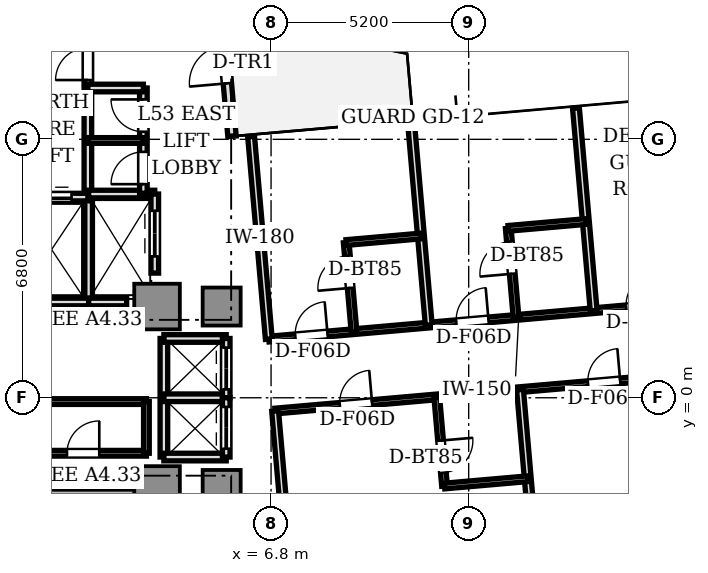
"""IFC4 building model, lengths in metres.
Left out: names, types, materials, properties, quantities, classifications, styles, units other than length and angle.
Written with IfcOpenShell. Run it as: python <this file> out.ifc"""

import sys

from ifc_helpers import new_model, si_unit, direction, frame, frame_2d, origin, origin_2d, place, context, subcontext, project, spatial, rectangle, extrude, source, transform, mapped, element, fill, save


model = new_model("IFC4")
c1 = context("Model", 3, precision=1e-05, world=origin(), true_north=direction((0.0, 1.0)))
c2 = subcontext(c1, "Body", "Model", "MODEL_VIEW")
j1 = project(units=[si_unit("LENGTHUNIT", "METRE"), si_unit("PLANEANGLEUNIT", "RADIAN")], contexts=[c1])
p1 = place(None, origin())
s1 = spatial("IfcSite", under=j1, at=p1, CompositionType="ELEMENT")
p2 = place(p1, origin())
s2 = spatial("IfcBuilding", under=s1, at=p2, CompositionType="ELEMENT")
p3 = place(p2, frame((0.0, 0.0, 191.95)))
s3 = spatial("IfcBuildingStorey", under=s2, at=p3, CompositionType="ELEMENT", Elevation=191.95)
m1 = source(origin(), c2, "Body", "SweptSolid", [
    extrude(rectangle(XDim=1.2, YDim=1.2, at=origin_2d()), origin(), (0.0, 0.0, 1.0), 3.11),
])
for number, where, z_axis, x_axis in (
    (1, (3.8, 2.4, 0.0), (0.0, 0.0, 1.0), (1.0, 0.0, 0.0)),
    (2, (3.8, -2.4, 0.0), (0.0, 0.0, 1.0), (1.0, 0.0, 0.0)),
):
    element("IfcColumn", number, at=place(p3, frame(where, z_axis=z_axis, x_axis=x_axis)), inside=s3, PredefinedType="COLUMN", context=c2, shape_type="MappedRepresentation", body=[
        mapped(m1, transform((0.0, 0.0, 0.0), scale=1.0)),
    ])
m2 = source(origin(), c2, "Body", "SweptSolid", [
    extrude(rectangle(XDim=1.0, YDim=1.0, at=origin_2d()), origin(), (0.0, 0.0, 1.0), 3.11),
])
for number, where, z_axis, x_axis in (
    (3, (5.5, 2.4, 0.0), (0.0, 0.0, 1.0), (1.0, 0.0, 0.0)),
    (4, (5.5, -2.4, 0.0), (0.0, 0.0, 1.0), (1.0, 0.0, 0.0)),
):
    element("IfcColumn", number, at=place(p3, frame(where, z_axis=z_axis, x_axis=x_axis)), inside=s3, PredefinedType="COLUMN", context=c2, shape_type="MappedRepresentation", body=[
        mapped(m2, transform((0.0, 0.0, 0.0), scale=1.0)),
    ])
p4 = place(p3, frame((5.772, 6.879, 0.0), z_axis=(0.0, 0.0, 1.0), x_axis=(-0.087168071984, 0.996193619346, 0.0)))
e5 = element("IfcWall", 5, at=p4, inside=s3, PredefinedType="STANDARD", context=c2, shape_type="SweptSolid", body=[
    extrude(rectangle(XDim=2.7, YDim=0.22, at=frame_2d((1.35, 0.0))), origin(), (0.0, 0.0, 1.0), 3.11),
])
p5 = place(p4, frame((1.4, 0.0, 0.0)))
e6 = element("IfcOpeningElement", 6, at=p5, cuts=e5, PredefinedType="OPENING", context=c2, shape_type="SweptSolid", body=[
    extrude(rectangle(XDim=1.0, YDim=2.2, at=frame_2d((0.5, 1.1))), frame((0.0, 0.12, 0.0), z_axis=(0.0, -1.0, 0.0), x_axis=(1.0, 0.0, 0.0)), (0.0, 0.0, 1.0), 0.24),
])
p6 = place(p3, frame((0.0, -2.5, 0.0), z_axis=(0.0, 0.0, 1.0), x_axis=(1.0, 0.0, 0.0)))
e7 = element("IfcWall", 7, at=p6, inside=s3, PredefinedType="SOLIDWALL", context=c2, shape_type="SweptSolid", body=[
    extrude(rectangle(XDim=3.72, YDim=0.2, at=frame_2d((1.86, 0.0))), origin(), (0.0, 0.0, 1.0), 3.11),
])
p7 = place(p3, frame((1.98, 5.32, 0.0), z_axis=(0.0, 0.0, 1.0), x_axis=(0.0, 1.0, 0.0)))
e8 = element("IfcWall", 8, at=p7, inside=s3, PredefinedType="SOLIDWALL", context=c2, shape_type="SweptSolid", body=[
    extrude(rectangle(XDim=4.66, YDim=0.2, at=frame_2d((2.33, 0.0))), origin(), (0.0, 0.0, 1.0), 2.66),
])
p8 = place(p7, frame((3.04, 0.0, 0.0)))
e9 = element("IfcOpeningElement", 9, at=p8, cuts=e8, PredefinedType="OPENING", context=c2, shape_type="SweptSolid", body=[
    extrude(rectangle(XDim=0.85, YDim=2.1, at=frame_2d((0.425, 1.05))), frame((0.0, 0.11, 0.0), z_axis=(0.0, -1.0, 0.0), x_axis=(1.0, 0.0, 0.0)), (0.0, 0.0, 1.0), 0.22),
])
p9 = place(p3, frame((2.0, 2.5, 0.0), z_axis=(0.0, 0.0, 1.0), x_axis=(0.0, 1.0, 0.0)))
e10 = element("IfcWall", 10, at=p9, inside=s3, PredefinedType="SOLIDWALL", context=c2, shape_type="SweptSolid", body=[
    extrude(rectangle(XDim=2.78, YDim=0.2, at=frame_2d((1.39, 0.0))), origin(), (0.0, 0.0, 1.0), 2.66),
])
p10 = place(p3, frame((0.05, 2.52, 0.0), z_axis=(0.0, 0.0, 1.0), x_axis=(1.0, 0.0, 0.0)))
e11 = element("IfcWall", 11, at=p10, inside=s3, PredefinedType="SOLIDWALL", context=c2, shape_type="SweptSolid", body=[
    extrude(rectangle(XDim=1.95, YDim=0.2, at=frame_2d((0.975, 0.0))), origin(), (0.0, 0.0, 1.0), 2.66),
])
p11 = place(p3, frame((0.05, 5.28, 0.0), z_axis=(0.0, 0.0, 1.0), x_axis=(1.0, 0.0, 0.0)))
e12 = element("IfcWall", 12, at=p11, inside=s3, PredefinedType="SOLIDWALL", context=c2, shape_type="SweptSolid", body=[
    extrude(rectangle(XDim=1.93, YDim=0.2, at=frame_2d((0.965, 0.0))), origin(), (0.0, 0.0, 1.0), 2.66),
])
p12 = place(p11, frame((0.4, 0.0, 0.0)))
e13 = element("IfcOpeningElement", 13, at=p12, cuts=e12, PredefinedType="OPENING", context=c2, shape_type="SweptSolid", body=[
    extrude(rectangle(XDim=1.1, YDim=2.2, at=frame_2d((0.55, 1.1))), frame((0.0, 0.11, 0.0), z_axis=(0.0, -1.0, 0.0), x_axis=(1.0, 0.0, 0.0)), (0.0, 0.0, 1.0), 0.22),
])
p13 = place(p3, frame((2.0, 2.52, 0.0), z_axis=(0.0, 0.0, 1.0), x_axis=(1.0, 0.0, 0.0)))
e14 = element("IfcWall", 14, at=p13, inside=s3, PredefinedType="SOLIDWALL", context=c2, shape_type="SweptSolid", body=[
    extrude(rectangle(XDim=1.0, YDim=0.2, at=frame_2d((0.5, 0.0))), origin(), (0.0, 0.0, 1.0), 2.66),
])
p14 = place(p3, frame((2.0, 5.36, 0.0), z_axis=(0.0, 0.0, 1.0), x_axis=(1.0, 0.0, 0.0)))
e15 = element("IfcWall", 15, at=p14, inside=s3, PredefinedType="SOLIDWALL", context=c2, shape_type="SweptSolid", body=[
    extrude(rectangle(XDim=1.74, YDim=0.2, at=frame_2d((0.87, 0.0))), origin(), (0.0, 0.0, 1.0), 2.66),
])
p15 = place(p3, frame((3.74, 3.28, 0.0), z_axis=(0.0, 0.0, 1.0), x_axis=(0.0, 1.0, 0.0)))
e16 = element("IfcWall", 16, at=p15, inside=s3, PredefinedType="SOLIDWALL", context=c2, shape_type="SweptSolid", body=[
    extrude(rectangle(XDim=2.08, YDim=0.2, at=frame_2d((1.04, 0.0))), origin(), (0.0, 0.0, 1.0), 2.66),
])
p16 = place(p15, frame((0.44, 0.0, 0.0)))
e17 = element("IfcOpeningElement", 17, at=p16, cuts=e16, PredefinedType="OPENING", context=c2, shape_type="SweptSolid", body=[
    extrude(rectangle(XDim=1.2, YDim=2.2, at=frame_2d((0.6, 1.1))), frame((0.0, 0.11, 0.0), z_axis=(0.0, -1.0, 0.0), x_axis=(1.0, 0.0, 0.0)), (0.0, 0.0, 1.0), 0.22),
])
p17 = place(p3, frame((3.98, -1.56, 0.0), z_axis=(0.0, 0.0, 1.0), x_axis=(0.0, 1.0, 0.0)))
e18 = element("IfcWall", 18, at=p17, inside=s3, PredefinedType="SOLIDWALL", context=c2, shape_type="SweptSolid", body=[
    extrude(rectangle(XDim=3.12, YDim=0.2, at=frame_2d((1.56, 0.0))), origin(), (0.0, 0.0, 1.0), 2.28),
])
for number, where, z_axis, x_axis in (
    (19, (3.98, 1.56, 0.0), (0.0, 0.0, 1.0), (1.0, 0.0, 0.0)),
    (20, (3.98, -1.56, 0.0), (0.0, 0.0, 1.0), (1.0, 0.0, 0.0)),
    (21, (3.98, 0.0, 0.0), (0.0, 0.0, 1.0), (1.0, 0.0, 0.0)),
):
    element("IfcWall", number, at=place(p3, frame(where, z_axis=z_axis, x_axis=x_axis)), inside=s3, PredefinedType="SOLIDWALL", context=c2, shape_type="SweptSolid", body=[
        extrude(rectangle(XDim=1.64, YDim=0.2, at=frame_2d((0.82, 0.0))), origin(), (0.0, 0.0, 1.0), 2.66),
    ])
p18 = place(p3, frame((5.62, 0.0, 0.0), z_axis=(0.0, 0.0, 1.0), x_axis=(0.0, 1.0, 0.0)))
e22 = element("IfcWall", 22, at=p18, inside=s3, PredefinedType="SOLIDWALL", context=c2, shape_type="SweptSolid", body=[
    extrude(rectangle(XDim=1.56, YDim=0.2, at=frame_2d((0.78, 0.0))), origin(), (0.0, 0.0, 1.0), 2.66),
])
p19 = place(p18, frame((0.22, 0.0, 0.0)))
e23 = element("IfcOpeningElement", 23, at=p19, cuts=e22, PredefinedType="OPENING", context=c2, shape_type="SweptSolid", body=[
    extrude(rectangle(XDim=1.1, YDim=2.2, at=frame_2d((0.55, 1.1))), frame((0.0, 0.11, 0.0), z_axis=(0.0, -1.0, 0.0), x_axis=(1.0, 0.0, 0.0)), (0.0, 0.0, 1.0), 0.22),
])
p20 = place(p3, frame((5.62, -1.56, 0.0), z_axis=(0.0, 0.0, 1.0), x_axis=(0.0, 1.0, 0.0)))
e24 = element("IfcWall", 24, at=p20, inside=s3, PredefinedType="SOLIDWALL", context=c2, shape_type="SweptSolid", body=[
    extrude(rectangle(XDim=1.56, YDim=0.2, at=frame_2d((0.78, 0.0))), origin(), (0.0, 0.0, 1.0), 2.66),
])
p21 = place(p20, frame((0.22, 0.0, 0.0)))
e25 = element("IfcOpeningElement", 25, at=p21, cuts=e24, PredefinedType="OPENING", context=c2, shape_type="SweptSolid", body=[
    extrude(rectangle(XDim=1.1, YDim=2.2, at=frame_2d((0.55, 1.1))), frame((0.0, 0.11, 0.0), z_axis=(0.0, -1.0, 0.0), x_axis=(1.0, 0.0, 0.0)), (0.0, 0.0, 1.0), 0.22),
])
p22 = place(p3, frame((3.44, 5.38, 0.0), z_axis=(0.0, 0.0, 1.0), x_axis=(0.0, 1.0, 0.0)))
e26 = element("IfcWall", 26, at=p22, inside=s3, PredefinedType="SOLIDWALL", context=c2, shape_type="SweptSolid", body=[
    extrude(rectangle(XDim=2.77, YDim=0.2, at=frame_2d((1.385, 0.0))), origin(), (0.0, 0.0, 1.0), 2.66),
])
p23 = place(p22, frame((0.24, 0.0, 0.0)))
e27 = element("IfcOpeningElement", 27, at=p23, cuts=e26, PredefinedType="OPENING", context=c2, shape_type="SweptSolid", body=[
    extrude(rectangle(XDim=0.85, YDim=2.1, at=frame_2d((0.425, 1.05))), frame((0.0, 0.11, 0.0), z_axis=(0.0, -1.0, 0.0), x_axis=(1.0, 0.0, 0.0)), (0.0, 0.0, 1.0), 0.22),
])
p24 = place(p22, frame((1.62, 0.0, 0.0)))
e28 = element("IfcOpeningElement", 28, at=p24, cuts=e26, PredefinedType="OPENING", context=c2, shape_type="SweptSolid", body=[
    extrude(rectangle(XDim=0.85, YDim=2.1, at=frame_2d((0.425, 1.05))), frame((0.0, 0.11, 0.0), z_axis=(0.0, -1.0, 0.0), x_axis=(1.0, 0.0, 0.0)), (0.0, 0.0, 1.0), 0.22),
])
p25 = place(p3, frame((1.98, 8.15, 0.0), z_axis=(0.0, 0.0, 1.0), x_axis=(1.0, 0.0, 0.0)))
e29 = element("IfcWall", 29, at=p25, inside=s3, PredefinedType="SOLIDWALL", context=c2, shape_type="SweptSolid", body=[
    extrude(rectangle(XDim=1.46, YDim=0.2, at=frame_2d((0.73, 0.0))), origin(), (0.0, 0.0, 1.0), 2.66),
])
p26 = place(p3, frame((1.98, 6.77, 0.0), z_axis=(0.0, 0.0, 1.0), x_axis=(1.0, 0.0, 0.0)))
e30 = element("IfcWall", 30, at=p26, inside=s3, PredefinedType="PARTITIONING", context=c2, shape_type="SweptSolid", body=[
    extrude(rectangle(XDim=1.46, YDim=0.15, at=frame_2d((0.73, 0.0))), origin(), (0.0, 0.0, 1.0), 2.66),
])
p27 = place(p3, frame((0.38, -0.1, 0.0), z_axis=(0.0, 0.0, 1.0), x_axis=(1.0, 0.0, 0.0)))
e31 = element("IfcWall", 31, at=p27, inside=s3, PredefinedType="PARTITIONING", context=c2, shape_type="SweptSolid", body=[
    extrude(rectangle(XDim=3.14, YDim=0.15, at=frame_2d((1.57, 0.0))), origin(), (0.0, 0.0, 1.0), 2.66),
])
p28 = place(p3, frame((0.38, -1.46, 0.0), z_axis=(0.0, 0.0, 1.0), x_axis=(1.0, 0.0, 0.0)))
e32 = element("IfcWall", 32, at=p28, inside=s3, PredefinedType="PARTITIONING", context=c2, shape_type="SweptSolid", body=[
    extrude(rectangle(XDim=3.14, YDim=0.15, at=frame_2d((1.57, 0.0))), origin(), (0.0, 0.0, 1.0), 2.66),
])
p29 = place(p28, frame((1.05, 0.0, 0.0)))
e33 = element("IfcOpeningElement", 33, at=p29, cuts=e32, PredefinedType="OPENING", context=c2, shape_type="SweptSolid", body=[
    extrude(rectangle(XDim=0.85, YDim=2.1, at=frame_2d((0.425, 1.05))), frame((0.0, 0.085, 0.0), z_axis=(0.0, -1.0, 0.0), x_axis=(1.0, 0.0, 0.0)), (0.0, 0.0, 1.0), 0.17),
])
p30 = place(p3, frame((3.52, -1.46, 0.0), z_axis=(0.0, 0.0, 1.0), x_axis=(0.0, 1.0, 0.0)))
e34 = element("IfcWall", 34, at=p30, inside=s3, PredefinedType="PARTITIONING", context=c2, shape_type="SweptSolid", body=[
    extrude(rectangle(XDim=1.36, YDim=0.15, at=frame_2d((0.68, 0.0))), origin(), (0.0, 0.0, 1.0), 2.28),
])
p31 = place(p3, frame((6.741, 1.543, 0.0), z_axis=(0.0, 0.0, 1.0), x_axis=(0.996195062465, 0.087151577845, 0.0)))
e35 = element("IfcWall", 35, at=p31, inside=s3, PredefinedType="PARTITIONING", context=c2, shape_type="SweptSolid", body=[
    extrude(rectangle(XDim=13.2, YDim=0.15, at=frame_2d((6.6, 0.0))), origin(), (0.0, 0.0, 1.0), 2.66),
])
p32 = place(p31, frame((0.7, 0.0, 0.0)))
e36 = element("IfcOpeningElement", 36, at=p32, cuts=e35, PredefinedType="OPENING", context=c2, shape_type="SweptSolid", body=[
    extrude(rectangle(XDim=0.85, YDim=2.1, at=frame_2d((0.425, 1.05))), frame((0.0, 0.085, 0.0), z_axis=(0.0, -1.0, 0.0), x_axis=(1.0, 0.0, 0.0)), (0.0, 0.0, 1.0), 0.17),
])
p33 = place(p31, frame((4.952, 0.0, 0.0)))
e37 = element("IfcOpeningElement", 37, at=p33, cuts=e35, PredefinedType="OPENING", context=c2, shape_type="SweptSolid", body=[
    extrude(rectangle(XDim=0.85, YDim=2.1, at=frame_2d((0.425, 1.05))), frame((0.0, 0.085, 0.0), z_axis=(0.0, -1.0, 0.0), x_axis=(1.0, 0.0, 0.0)), (0.0, 0.0, 1.0), 0.17),
])
p34 = place(p31, frame((9.44, 0.0, 0.0)))
e38 = element("IfcOpeningElement", 38, at=p34, cuts=e35, PredefinedType="OPENING", context=c2, shape_type="SweptSolid", body=[
    extrude(rectangle(XDim=0.85, YDim=2.1, at=frame_2d((0.425, 1.05))), frame((0.0, 0.085, 0.0), z_axis=(0.0, -1.0, 0.0), x_axis=(1.0, 0.0, 0.0)), (0.0, 0.0, 1.0), 0.17),
])
p35 = place(p3, frame((6.907, -0.349, 0.0), z_axis=(0.0, 0.0, 1.0), x_axis=(0.996195062465, 0.087151577845, 0.0)))
e39 = element("IfcWall", 39, at=p35, inside=s3, PredefinedType="PARTITIONING", context=c2, shape_type="SweptSolid", body=[
    extrude(rectangle(XDim=13.2, YDim=0.15, at=frame_2d((6.6, 0.0))), origin(), (0.0, 0.0, 1.0), 2.66),
])
p36 = place(p35, frame((1.71, 0.0, 0.0)))
e40 = element("IfcOpeningElement", 40, at=p36, cuts=e39, PredefinedType="OPENING", context=c2, shape_type="SweptSolid", body=[
    extrude(rectangle(XDim=0.85, YDim=2.1, at=frame_2d((0.425, 1.05))), frame((0.0, 0.085, 0.0), z_axis=(0.0, -1.0, 0.0), x_axis=(1.0, 0.0, 0.0)), (0.0, 0.0, 1.0), 0.17),
])
p37 = place(p35, frame((8.264, 0.0, 0.0)))
e41 = element("IfcOpeningElement", 41, at=p37, cuts=e39, PredefinedType="OPENING", context=c2, shape_type="SweptSolid", body=[
    extrude(rectangle(XDim=0.85, YDim=2.1, at=frame_2d((0.425, 1.05))), frame((0.0, 0.085, 0.0), z_axis=(0.0, -1.0, 0.0), x_axis=(1.0, 0.0, 0.0)), (0.0, 0.0, 1.0), 0.17),
])
for number, where, z_axis, x_axis in (
    (42, (6.741, 1.543, 0.0), (0.0, 0.0, 1.0), (-0.087, 0.996, 0.0)),
    (43, (7.373, -5.679, 0.0), (0.0, 0.0, 1.0), (-0.087, 0.996, 0.0)),
    (44, (10.949, 1.912, 0.0), (0.0, 0.0, 1.0), (-0.087, 0.996, 0.0)),
):
    element("IfcWall", number, at=place(p3, frame(where, z_axis=z_axis, x_axis=x_axis)), inside=s3, PredefinedType="PARTITIONING", context=c2, shape_type="SweptSolid", body=[
        extrude(rectangle(XDim=5.35, YDim=0.18, at=frame_2d((2.675, 0.0))), origin(), (0.0, 0.0, 1.0), 2.66),
    ])
p38 = place(p3, frame((8.983, 1.74, 0.0), z_axis=(0.0, 0.0, 1.0), x_axis=(-0.087224846905, 0.996188649846, 0.0)))
e45 = element("IfcWall", 45, at=p38, inside=s3, PredefinedType="PARTITIONING", context=c2, shape_type="SweptSolid", body=[
    extrude(rectangle(XDim=2.354, YDim=0.15, at=frame_2d((1.177, 0.0))), origin(), (0.0, 0.0, 1.0), 2.66),
])
p39 = place(p38, frame((1.154, 0.0, 0.0)))
e46 = element("IfcOpeningElement", 46, at=p39, cuts=e45, PredefinedType="OPENING", context=c2, shape_type="SweptSolid", body=[
    extrude(rectangle(XDim=0.85, YDim=2.1, at=frame_2d((0.425, 1.05))), frame((0.0, 0.085, 0.0), z_axis=(0.0, -1.0, 0.0), x_axis=(1.0, 0.0, 0.0)), (0.0, 0.0, 1.0), 0.17),
])
p40 = place(p3, frame((8.777, 4.084, 0.0), z_axis=(0.0, 0.0, 1.0), x_axis=(0.996191703625, 0.087189962887, 0.0)))
e47 = element("IfcWall", 47, at=p40, inside=s3, PredefinedType="PARTITIONING", context=c2, shape_type="SweptSolid", body=[
    extrude(rectangle(XDim=1.974, YDim=0.15, at=frame_2d((0.987, 0.0))), origin(), (0.0, 0.0, 1.0), 2.66),
])
p41 = place(p3, frame((15.289, 2.291, 0.0), z_axis=(0.0, 0.0, 1.0), x_axis=(-0.087161289348, 0.996194212812, 0.0)))
e48 = element("IfcWall", 48, at=p41, inside=s3, PredefinedType="PARTITIONING", context=c2, shape_type="SweptSolid", body=[
    extrude(rectangle(XDim=5.35, YDim=0.18, at=frame_2d((2.675, 0.0))), origin(), (0.0, 0.0, 1.0), 2.66),
])
p42 = place(p3, frame((13.246, 2.113, 0.0), z_axis=(0.0, 0.0, 1.0), x_axis=(-0.087224846905, 0.996188649846, 0.0)))
e49 = element("IfcWall", 49, at=p42, inside=s3, PredefinedType="PARTITIONING", context=c2, shape_type="SweptSolid", body=[
    extrude(rectangle(XDim=2.354, YDim=0.15, at=frame_2d((1.177, 0.0))), origin(), (0.0, 0.0, 1.0), 2.66),
])
p43 = place(p42, frame((1.154, 0.0, 0.0)))
e50 = element("IfcOpeningElement", 50, at=p43, cuts=e49, PredefinedType="OPENING", context=c2, shape_type="SweptSolid", body=[
    extrude(rectangle(XDim=0.85, YDim=2.1, at=frame_2d((0.425, 1.05))), frame((0.0, 0.085, 0.0), z_axis=(0.0, -1.0, 0.0), x_axis=(1.0, 0.0, 0.0)), (0.0, 0.0, 1.0), 0.17),
])
p44 = place(p3, frame((13.041, 4.458, 0.0), z_axis=(0.0, 0.0, 1.0), x_axis=(0.99619307114, 0.087174336889, 0.0)))
e51 = element("IfcWall", 51, at=p44, inside=s3, PredefinedType="PARTITIONING", context=c2, shape_type="SweptSolid", body=[
    extrude(rectangle(XDim=2.05, YDim=0.15, at=frame_2d((1.025, 0.0))), origin(), (0.0, 0.0, 1.0), 2.66),
])
p45 = place(p3, frame((13.35, 0.214, 0.0), z_axis=(0.0, 0.0, 1.0), x_axis=(0.087161289348, -0.996194212812, 0.0)))
e52 = element("IfcWall", 52, at=p45, inside=s3, PredefinedType="PARTITIONING", context=c2, shape_type="SweptSolid", body=[
    extrude(rectangle(XDim=5.35, YDim=0.18, at=frame_2d((2.675, 0.0))), origin(), (0.0, 0.0, 1.0), 2.66),
])
p46 = place(p3, frame((11.159, 0.023, 0.0), z_axis=(0.0, 0.0, 1.0), x_axis=(0.087224846905, -0.996188649846, 0.0)))
e53 = element("IfcWall", 53, at=p46, inside=s3, PredefinedType="PARTITIONING", context=c2, shape_type="SweptSolid", body=[
    extrude(rectangle(XDim=2.354, YDim=0.15, at=frame_2d((1.177, 0.0))), origin(), (0.0, 0.0, 1.0), 2.66),
])
p47 = place(p46, frame((1.154, 0.0, 0.0)))
e54 = element("IfcOpeningElement", 54, at=p47, cuts=e53, PredefinedType="OPENING", context=c2, shape_type="SweptSolid", body=[
    extrude(rectangle(XDim=0.85, YDim=2.1, at=frame_2d((0.425, 1.05))), frame((0.0, 0.085, 0.0), z_axis=(0.0, -1.0, 0.0), x_axis=(1.0, 0.0, 0.0)), (0.0, 0.0, 1.0), 0.17),
])
p48 = place(p3, frame((11.365, -2.322, 0.0), z_axis=(0.0, 0.0, 1.0), x_axis=(0.996195042958, 0.087151800816, 0.0)))
e55 = element("IfcWall", 55, at=p48, inside=s3, PredefinedType="PARTITIONING", context=c2, shape_type="SweptSolid", body=[
    extrude(rectangle(XDim=2.199, YDim=0.15, at=frame_2d((1.1, 0.0))), origin(), (0.0, 0.0, 1.0), 2.66),
])
m3 = source(origin(), c2, "Body", "SweptSolid", [
    extrude(rectangle(XDim=1.0, YDim=0.05, at=origin_2d()), origin(), (0.0, 0.0, 1.0), 2.2),
])
p49 = place(p5, frame((0.5, 0.0, 0.0)))
e56 = element("IfcDoor", 56, at=p49, inside=s3, OperationType="SINGLE_SWING_LEFT", PredefinedType="DOOR", context=c2, shape_type="MappedRepresentation", body=[
    mapped(m3, transform((0.0, 0.0, 0.0), scale=1.0)),
])
fill(e6, e56)
m4 = source(origin(), c2, "Body", "SweptSolid", [
    extrude(rectangle(XDim=0.85, YDim=0.05, at=origin_2d()), origin(), (0.0, 0.0, 1.0), 2.1),
])
p50 = place(p8, frame((0.425, 0.0, 0.0)))
e57 = element("IfcDoor", 57, at=p50, inside=s3, OperationType="SINGLE_SWING_LEFT", PredefinedType="DOOR", context=c2, shape_type="MappedRepresentation", body=[
    mapped(m4, transform((0.0, 0.0, 0.0), scale=1.0)),
])
fill(e9, e57)
m5 = source(origin(), c2, "Body", "SweptSolid", [
    extrude(rectangle(XDim=1.1, YDim=0.05, at=origin_2d()), origin(), (0.0, 0.0, 1.0), 2.2),
])
p51 = place(p12, frame((0.55, 0.0, 0.0)))
e58 = element("IfcDoor", 58, at=p51, inside=s3, OperationType="DOUBLE_DOOR_SLIDING", PredefinedType="DOOR", context=c2, shape_type="MappedRepresentation", body=[
    mapped(m5, transform((0.0, 0.0, 0.0), scale=1.0)),
])
fill(e13, e58)
m6 = source(origin(), c2, "Body", "SweptSolid", [
    extrude(rectangle(XDim=1.2, YDim=0.05, at=origin_2d()), origin(), (0.0, 0.0, 1.0), 2.2),
])
p52 = place(p16, frame((0.6, 0.0, 0.0)))
e59 = element("IfcDoor", 59, at=p52, inside=s3, OperationType="DOUBLE_DOOR_SLIDING", PredefinedType="DOOR", context=c2, shape_type="MappedRepresentation", body=[
    mapped(m6, transform((0.0, 0.0, 0.0), scale=1.0)),
])
fill(e17, e59)
p53 = place(p19, frame((0.55, 0.0, 0.0)))
e60 = element("IfcDoor", 60, at=p53, inside=s3, OperationType="DOUBLE_DOOR_SLIDING", PredefinedType="DOOR", context=c2, shape_type="MappedRepresentation", body=[
    mapped(m5, transform((0.0, 0.0, 0.0), scale=1.0)),
])
fill(e23, e60)
p54 = place(p21, frame((0.55, 0.0, 0.0)))
e61 = element("IfcDoor", 61, at=p54, inside=s3, OperationType="DOUBLE_DOOR_SLIDING", PredefinedType="DOOR", context=c2, shape_type="MappedRepresentation", body=[
    mapped(m5, transform((0.0, 0.0, 0.0), scale=1.0)),
])
fill(e25, e61)
p55 = place(p23, frame((0.425, 0.0, 0.0)))
e62 = element("IfcDoor", 62, at=p55, inside=s3, OperationType="SINGLE_SWING_LEFT", PredefinedType="DOOR", context=c2, shape_type="MappedRepresentation", body=[
    mapped(m4, transform((0.0, 0.0, 0.0), scale=1.0)),
])
fill(e27, e62)
p56 = place(p24, frame((0.425, 0.0, 0.0)))
e63 = element("IfcDoor", 63, at=p56, inside=s3, OperationType="SINGLE_SWING_RIGHT", PredefinedType="DOOR", context=c2, shape_type="MappedRepresentation", body=[
    mapped(m4, transform((0.0, 0.0, 0.0), scale=1.0)),
])
fill(e28, e63)
p57 = place(p29, frame((0.425, 0.0, 0.0)))
e64 = element("IfcDoor", 64, at=p57, inside=s3, OperationType="SINGLE_SWING_RIGHT", PredefinedType="DOOR", context=c2, shape_type="MappedRepresentation", body=[
    mapped(m4, transform((0.0, 0.0, 0.0), scale=1.0)),
])
fill(e33, e64)
p58 = place(p39, frame((0.425, 0.0, 0.0)))
e65 = element("IfcDoor", 65, at=p58, inside=s3, OperationType="SINGLE_SWING_LEFT", PredefinedType="DOOR", context=c2, shape_type="MappedRepresentation", body=[
    mapped(m4, transform((0.0, 0.0, 0.0), scale=1.0)),
])
fill(e46, e65)
p59 = place(p32, frame((0.425, 0.0, 0.0)))
e66 = element("IfcDoor", 66, at=p59, inside=s3, OperationType="SINGLE_SWING_RIGHT", PredefinedType="DOOR", context=c2, shape_type="MappedRepresentation", body=[
    mapped(m4, transform((0.0, 0.0, 0.0), scale=1.0)),
])
fill(e36, e66)
p60 = place(p43, frame((0.425, 0.0, 0.0)))
e67 = element("IfcDoor", 67, at=p60, inside=s3, OperationType="SINGLE_SWING_LEFT", PredefinedType="DOOR", context=c2, shape_type="MappedRepresentation", body=[
    mapped(m4, transform((0.0, 0.0, 0.0), scale=1.0)),
])
fill(e50, e67)
p61 = place(p33, frame((0.425, 0.0, 0.0)))
e68 = element("IfcDoor", 68, at=p61, inside=s3, OperationType="SINGLE_SWING_RIGHT", PredefinedType="DOOR", context=c2, shape_type="MappedRepresentation", body=[
    mapped(m4, transform((0.0, 0.0, 0.0), scale=1.0)),
])
fill(e37, e68)
p62 = place(p34, frame((0.425, 0.0, 0.0)))
e69 = element("IfcDoor", 69, at=p62, inside=s3, OperationType="SINGLE_SWING_RIGHT", PredefinedType="DOOR", context=c2, shape_type="MappedRepresentation", body=[
    mapped(m4, transform((0.0, 0.0, 0.0), scale=1.0)),
])
fill(e38, e69)
p63 = place(p47, frame((0.425, 0.0, 0.0)))
e70 = element("IfcDoor", 70, at=p63, inside=s3, OperationType="SINGLE_SWING_LEFT", PredefinedType="DOOR", context=c2, shape_type="MappedRepresentation", body=[
    mapped(m4, transform((0.0, 0.0, 0.0), scale=1.0)),
])
fill(e54, e70)
p64 = place(p36, frame((0.425, 0.0, 0.0)))
e71 = element("IfcDoor", 71, at=p64, inside=s3, OperationType="SINGLE_SWING_RIGHT", PredefinedType="DOOR", context=c2, shape_type="MappedRepresentation", body=[
    mapped(m4, transform((0.0, 0.0, 0.0), scale=1.0)),
])
fill(e40, e71)
p65 = place(p37, frame((0.425, 0.0, 0.0)))
e72 = element("IfcDoor", 72, at=p65, inside=s3, OperationType="SINGLE_SWING_RIGHT", PredefinedType="DOOR", context=c2, shape_type="MappedRepresentation", body=[
    mapped(m4, transform((0.0, 0.0, 0.0), scale=1.0)),
])
fill(e41, e72)
save(model, sys.argv[1])
